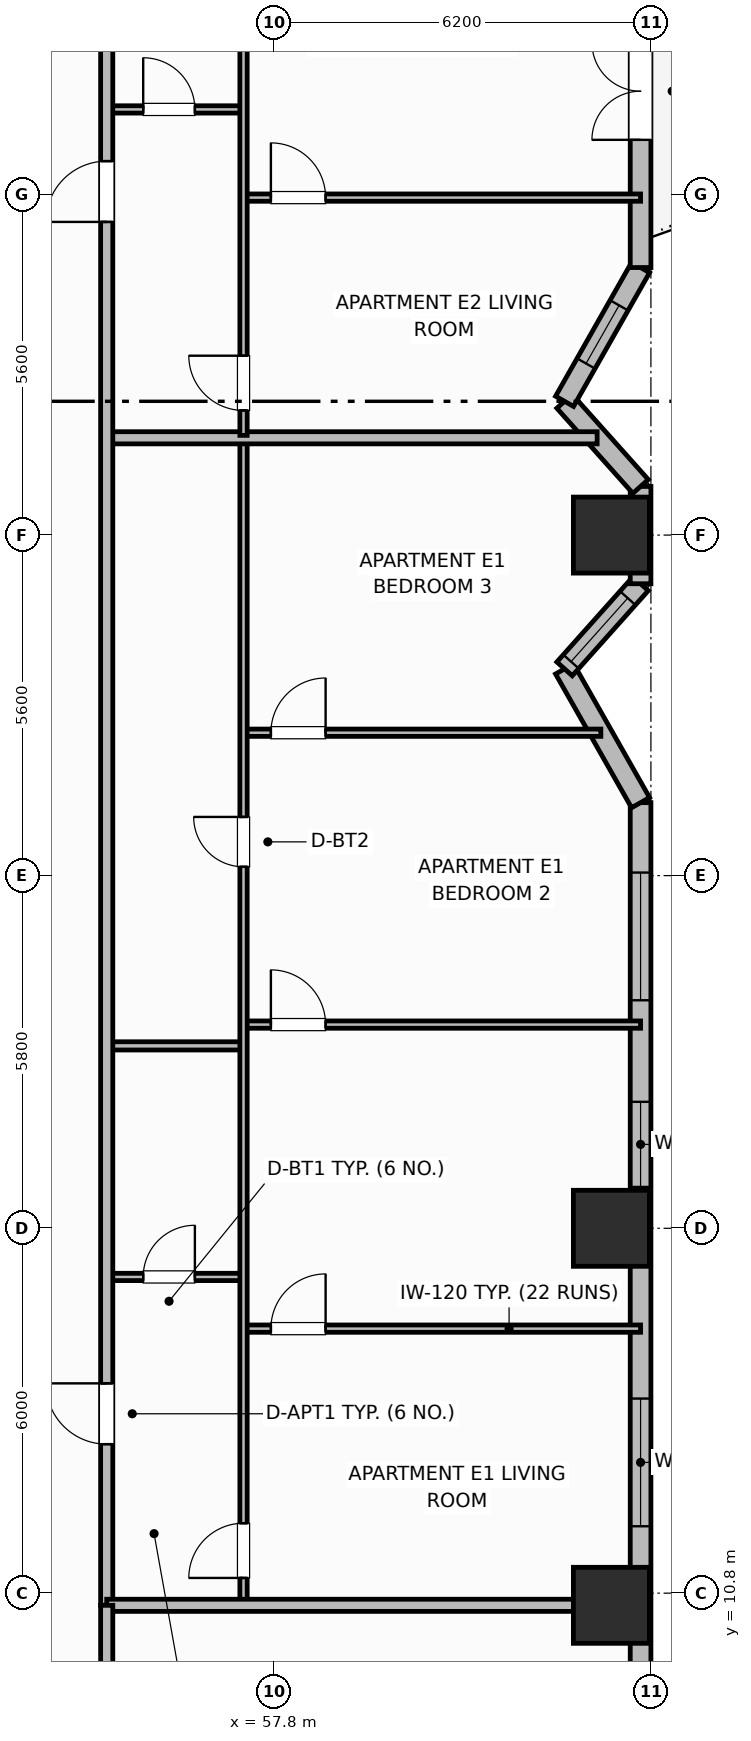
"""IFC4 building model, lengths in metres.
Left out: names, types, materials, properties, quantities, classifications, styles, units other than length and angle.
Written with IfcOpenShell. Run it as: python <this file> out.ifc"""

import sys

from ifc_helpers import new_model, si_unit, direction, frame, frame_2d, origin, origin_2d, place, context, subcontext, project, spatial, rectangle, extrude, element, fill, save


model = new_model("IFC4")
c1 = context("Model", 3, precision=1e-05, world=origin(), true_north=direction((0.0, 1.0)))
c2 = subcontext(c1, "Body", "Model", "MODEL_VIEW")
j1 = project(units=[si_unit("LENGTHUNIT", "METRE"), si_unit("PLANEANGLEUNIT", "RADIAN")], contexts=[c1])
p1 = place(None, origin())
s1 = spatial("IfcSite", under=j1, at=p1, CompositionType="ELEMENT")
p2 = place(p1, origin())
s2 = spatial("IfcBuilding", under=s1, at=p2, CompositionType="ELEMENT")
p3 = place(p2, frame((0.0, 0.0, 54.7)))
s3 = spatial("IfcBuildingStorey", under=s2, at=p3, CompositionType="ELEMENT", Elevation=54.7)
for number, where, z_axis, x_axis in (
    (1, (63.35, 10.6, 0.0), (0.0, 0.0, 1.0), (1.0, 0.0, 0.0)),
    (2, (63.35, 16.8, 0.0), (0.0, 0.0, 1.0), (1.0, 0.0, 0.0)),
    (3, (63.35, 28.2, 0.0), (0.0, 0.0, 1.0), (1.0, 0.0, 0.0)),
):
    element("IfcColumn", number, at=place(p3, frame(where, z_axis=z_axis, x_axis=x_axis)), inside=s3, PredefinedType="COLUMN", context=c2, shape_type="SweptSolid", body=[
        extrude(rectangle(XDim=1.25, YDim=1.25, at=origin_2d()), origin(), (0.0, 0.0, 1.0), 3.7),
    ])
p4 = place(p3, frame((63.83, 9.0, 0.0), z_axis=(0.0, 0.0, 1.0), x_axis=(0.0, 1.0, 0.0)))
e4 = element("IfcWall", 4, at=p4, inside=s3, PredefinedType="SOLIDWALL", context=c2, shape_type="SweptSolid", body=[
    extrude(rectangle(XDim=14.8, YDim=0.34, at=frame_2d((7.4, 0.0))), origin(), (0.0, 0.0, 1.0), 2.7),
])
p5 = place(p4, frame((2.9, 0.0, 0.68)))
e5 = element("IfcOpeningElement", 5, at=p5, cuts=e4, PredefinedType="OPENING", context=c2, shape_type="SweptSolid", body=[
    extrude(rectangle(XDim=2.1, YDim=1.9, at=frame_2d((1.05, 0.95))), frame((0.0, 0.18, 0.0), z_axis=(0.0, -1.0, 0.0), x_axis=(1.0, 0.0, 0.0)), (0.0, 0.0, 1.0), 0.36),
])
p6 = place(p4, frame((8.48, 0.0, 0.69)))
e6 = element("IfcOpeningElement", 6, at=p6, cuts=e4, PredefinedType="OPENING", context=c2, shape_type="SweptSolid", body=[
    extrude(rectangle(XDim=1.4, YDim=1.85, at=frame_2d((0.7, 0.925))), frame((0.0, 0.18, 0.0), z_axis=(0.0, -1.0, 0.0), x_axis=(1.0, 0.0, 0.0)), (0.0, 0.0, 1.0), 0.36),
])
p7 = place(p4, frame((11.55, 0.0, 0.68)))
e7 = element("IfcOpeningElement", 7, at=p7, cuts=e4, PredefinedType="OPENING", context=c2, shape_type="SweptSolid", body=[
    extrude(rectangle(XDim=2.1, YDim=1.9, at=frame_2d((1.05, 0.95))), frame((0.0, 0.18, 0.0), z_axis=(0.0, -1.0, 0.0), x_axis=(1.0, 0.0, 0.0)), (0.0, 0.0, 1.0), 0.36),
])
p8 = place(p3, frame((63.83, 23.8, 0.0), z_axis=(0.0, 0.0, 1.0), x_axis=(-0.494017696272, 0.869451847873, 0.0)))
e8 = element("IfcWall", 8, at=p8, inside=s3, PredefinedType="SOLIDWALL", context=c2, shape_type="SweptSolid", body=[
    extrude(rectangle(XDim=2.53, YDim=0.34, at=frame_2d((1.265, 0.0))), origin(), (0.0, 0.0, 1.0), 2.7),
])
p9 = place(p3, frame((62.58, 26.0, 0.0), z_axis=(0.0, 0.0, 1.0), x_axis=(0.666041619974, 0.74591457987, 0.0)))
e9 = element("IfcWall", 9, at=p9, inside=s3, PredefinedType="SOLIDWALL", context=c2, shape_type="SweptSolid", body=[
    extrude(rectangle(XDim=1.877, YDim=0.34, at=frame_2d((0.938, 0.0))), origin(), (0.0, 0.0, 1.0), 2.7),
])
p10 = place(p9, frame((0.16, 0.0, 0.69)))
e10 = element("IfcOpeningElement", 10, at=p10, cuts=e9, PredefinedType="OPENING", context=c2, shape_type="SweptSolid", body=[
    extrude(rectangle(XDim=1.4, YDim=1.85, at=frame_2d((0.7, 0.925))), frame((0.0, 0.18, 0.0), z_axis=(0.0, -1.0, 0.0), x_axis=(1.0, 0.0, 0.0)), (0.0, 0.0, 1.0), 0.36),
])
p11 = place(p3, frame((63.83, 27.4, 0.0), z_axis=(0.0, 0.0, 1.0), x_axis=(0.0, 1.0, 0.0)))
e11 = element("IfcWall", 11, at=p11, inside=s3, PredefinedType="SOLIDWALL", context=c2, shape_type="SweptSolid", body=[
    extrude(rectangle(XDim=1.6, YDim=0.34, at=frame_2d((0.8, 0.0))), origin(), (0.0, 0.0, 1.0), 2.7),
])
p12 = place(p3, frame((63.83, 29.0, 0.0), z_axis=(0.0, 0.0, 1.0), x_axis=(-0.666041619974, 0.74591457987, 0.0)))
e12 = element("IfcWall", 12, at=p12, inside=s3, PredefinedType="SOLIDWALL", context=c2, shape_type="SweptSolid", body=[
    extrude(rectangle(XDim=1.877, YDim=0.34, at=frame_2d((0.938, 0.0))), origin(), (0.0, 0.0, 1.0), 2.7),
])
p13 = place(p3, frame((62.58, 30.4, 0.0), z_axis=(0.0, 0.0, 1.0), x_axis=(0.493976255291, 0.869475393101, 0.0)))
e13 = element("IfcWall", 13, at=p13, inside=s3, PredefinedType="SOLIDWALL", context=c2, shape_type="SweptSolid", body=[
    extrude(rectangle(XDim=2.531, YDim=0.34, at=frame_2d((1.265, 0.0))), origin(), (0.0, 0.0, 1.0), 2.7),
])
p14 = place(p13, frame((0.715, 0.0, 0.89)))
e14 = element("IfcOpeningElement", 14, at=p14, cuts=e13, PredefinedType="OPENING", context=c2, shape_type="SweptSolid", body=[
    extrude(rectangle(XDim=1.1, YDim=1.65, at=frame_2d((0.55, 0.825))), frame((0.0, 0.18, 0.0), z_axis=(0.0, -1.0, 0.0), x_axis=(1.0, 0.0, 0.0)), (0.0, 0.0, 1.0), 0.36),
])
p15 = place(p3, frame((63.83, 32.6, 0.0), z_axis=(0.0, 0.0, 1.0), x_axis=(0.0, 1.0, 0.0)))
e15 = element("IfcWall", 15, at=p15, inside=s3, PredefinedType="SOLIDWALL", context=c2, shape_type="SweptSolid", body=[
    extrude(rectangle(XDim=14.8, YDim=0.34, at=frame_2d((7.4, 0.0))), origin(), (0.0, 0.0, 1.0), 2.7),
])
p16 = place(p15, frame((2.1, 0.0, 0.0)))
e16 = element("IfcOpeningElement", 16, at=p16, cuts=e15, PredefinedType="OPENING", context=c2, shape_type="SweptSolid", body=[
    extrude(rectangle(XDim=1.6, YDim=2.1, at=frame_2d((0.8, 1.05))), frame((0.0, 0.18, 0.0), z_axis=(0.0, -1.0, 0.0), x_axis=(1.0, 0.0, 0.0)), (0.0, 0.0, 1.0), 0.36),
])
p17 = place(p15, frame((7.68, 0.0, 0.89)))
e17 = element("IfcOpeningElement", 17, at=p17, cuts=e15, PredefinedType="OPENING", context=c2, shape_type="SweptSolid", body=[
    extrude(rectangle(XDim=1.1, YDim=1.65, at=frame_2d((0.55, 0.825))), frame((0.0, 0.18, 0.0), z_axis=(0.0, -1.0, 0.0), x_axis=(1.0, 0.0, 0.0)), (0.0, 0.0, 1.0), 0.36),
])
p18 = place(p15, frame((9.95, 0.0, 0.73)))
e18 = element("IfcOpeningElement", 18, at=p18, cuts=e15, PredefinedType="OPENING", context=c2, shape_type="SweptSolid", body=[
    extrude(rectangle(XDim=1.8, YDim=1.85, at=frame_2d((0.9, 0.925))), frame((0.0, 0.18, 0.0), z_axis=(0.0, -1.0, 0.0), x_axis=(1.0, 0.0, 0.0)), (0.0, 0.0, 1.0), 0.36),
])
p19 = place(p3, frame((55.05, 16.0, 0.0), z_axis=(0.0, 0.0, 1.0), x_axis=(1.0, 0.0, 0.0)))
e19 = element("IfcWall", 19, at=p19, inside=s3, PredefinedType="PARTITIONING", context=c2, shape_type="SweptSolid", body=[
    extrude(rectangle(XDim=2.25, YDim=0.12, at=frame_2d((1.125, 0.0))), origin(), (0.0, 0.0, 1.0), 2.53),
])
p20 = place(p19, frame((0.6, 0.0, 0.0)))
e20 = element("IfcOpeningElement", 20, at=p20, cuts=e19, PredefinedType="OPENING", context=c2, shape_type="SweptSolid", body=[
    extrude(rectangle(XDim=0.85, YDim=2.1, at=frame_2d((0.425, 1.05))), frame((0.0, 0.07, 0.0), z_axis=(0.0, -1.0, 0.0), x_axis=(1.0, 0.0, 0.0)), (0.0, 0.0, 1.0), 0.14),
])
p21 = place(p3, frame((55.05, 19.8, 0.0), z_axis=(0.0, 0.0, 1.0), x_axis=(1.0, 0.0, 0.0)))
e21 = element("IfcWall", 21, at=p21, inside=s3, PredefinedType="PARTITIONING", context=c2, shape_type="SweptSolid", body=[
    extrude(rectangle(XDim=2.25, YDim=0.135, at=frame_2d((1.125, 0.0))), origin(), (0.0, 0.0, 1.0), 2.53),
])
p22 = place(p3, frame((57.3, 15.15, 0.0), z_axis=(0.0, 0.0, 1.0), x_axis=(1.0, 0.0, 0.0)))
e22 = element("IfcWall", 22, at=p22, inside=s3, PredefinedType="PARTITIONING", context=c2, shape_type="SweptSolid", body=[
    extrude(rectangle(XDim=6.53, YDim=0.12, at=frame_2d((3.265, 0.0))), origin(), (0.0, 0.0, 1.0), 2.53),
])
p23 = place(p22, frame((0.45, 0.0, 0.0)))
e23 = element("IfcOpeningElement", 23, at=p23, cuts=e22, PredefinedType="OPENING", context=c2, shape_type="SweptSolid", body=[
    extrude(rectangle(XDim=0.9, YDim=2.1, at=frame_2d((0.45, 1.05))), frame((0.0, 0.07, 0.0), z_axis=(0.0, -1.0, 0.0), x_axis=(1.0, 0.0, 0.0)), (0.0, 0.0, 1.0), 0.14),
])
p24 = place(p3, frame((57.3, 20.15, 0.0), z_axis=(0.0, 0.0, 1.0), x_axis=(1.0, 0.0, 0.0)))
e24 = element("IfcWall", 24, at=p24, inside=s3, PredefinedType="PARTITIONING", context=c2, shape_type="SweptSolid", body=[
    extrude(rectangle(XDim=6.53, YDim=0.12, at=frame_2d((3.265, 0.0))), origin(), (0.0, 0.0, 1.0), 2.53),
])
p25 = place(p24, frame((0.45, 0.0, 0.0)))
e25 = element("IfcOpeningElement", 25, at=p25, cuts=e24, PredefinedType="OPENING", context=c2, shape_type="SweptSolid", body=[
    extrude(rectangle(XDim=0.9, YDim=2.1, at=frame_2d((0.45, 1.05))), frame((0.0, 0.07, 0.0), z_axis=(0.0, -1.0, 0.0), x_axis=(1.0, 0.0, 0.0)), (0.0, 0.0, 1.0), 0.14),
])
p26 = place(p3, frame((57.3, 24.95, 0.0), z_axis=(0.0, 0.0, 1.0), x_axis=(1.0, 0.0, 0.0)))
e26 = element("IfcWall", 26, at=p26, inside=s3, PredefinedType="PARTITIONING", context=c2, shape_type="SweptSolid", body=[
    extrude(rectangle(XDim=5.876, YDim=0.12, at=frame_2d((2.938, 0.0))), origin(), (0.0, 0.0, 1.0), 2.53),
])
p27 = place(p26, frame((0.45, 0.0, 0.0)))
e27 = element("IfcOpeningElement", 27, at=p27, cuts=e26, PredefinedType="OPENING", context=c2, shape_type="SweptSolid", body=[
    extrude(rectangle(XDim=0.9, YDim=2.1, at=frame_2d((0.45, 1.05))), frame((0.0, 0.07, 0.0), z_axis=(0.0, -1.0, 0.0), x_axis=(1.0, 0.0, 0.0)), (0.0, 0.0, 1.0), 0.14),
])
p28 = place(p3, frame((57.3, 10.64, 0.0), z_axis=(0.0, 0.0, 1.0), x_axis=(0.0, 1.0, 0.0)))
e28 = element("IfcWall", 28, at=p28, inside=s3, PredefinedType="PARTITIONING", context=c2, shape_type="SweptSolid", body=[
    extrude(rectangle(XDim=19.12, YDim=0.12, at=frame_2d((9.56, 0.0))), origin(), (0.0, 0.0, 1.0), 2.53),
])
p29 = place(p28, frame((0.41, 0.0, 0.0)))
e29 = element("IfcOpeningElement", 29, at=p29, cuts=e28, PredefinedType="OPENING", context=c2, shape_type="SweptSolid", body=[
    extrude(rectangle(XDim=0.9, YDim=2.1, at=frame_2d((0.45, 1.05))), frame((0.0, 0.07, 0.0), z_axis=(0.0, -1.0, 0.0), x_axis=(1.0, 0.0, 0.0)), (0.0, 0.0, 1.0), 0.14),
])
p30 = place(p28, frame((12.105, 0.0, 0.0)))
e30 = element("IfcOpeningElement", 30, at=p30, cuts=e28, PredefinedType="OPENING", context=c2, shape_type="SweptSolid", body=[
    extrude(rectangle(XDim=0.82, YDim=2.08, at=frame_2d((0.41, 1.04))), frame((0.0, 0.07, 0.0), z_axis=(0.0, -1.0, 0.0), x_axis=(1.0, 0.0, 0.0)), (0.0, 0.0, 1.0), 0.14),
])
p31 = place(p3, frame((55.05, 29.8, 0.0), z_axis=(0.0, 0.0, 1.0), x_axis=(1.0, 0.0, 0.0)))
e31 = element("IfcWall", 31, at=p31, inside=s3, PredefinedType="PARTITIONING", context=c2, shape_type="SweptSolid", body=[
    extrude(rectangle(XDim=8.066, YDim=0.2, at=frame_2d((4.033, 0.0))), origin(), (0.0, 0.0, 1.0), 2.53),
])
p32 = place(p3, frame((55.05, 35.2, 0.0), z_axis=(0.0, 0.0, 1.0), x_axis=(1.0, 0.0, 0.0)))
e32 = element("IfcWall", 32, at=p32, inside=s3, PredefinedType="PARTITIONING", context=c2, shape_type="SweptSolid", body=[
    extrude(rectangle(XDim=2.25, YDim=0.12, at=frame_2d((1.125, 0.0))), origin(), (0.0, 0.0, 1.0), 2.53),
])
p33 = place(p32, frame((0.6, 0.0, 0.0)))
e33 = element("IfcOpeningElement", 33, at=p33, cuts=e32, PredefinedType="OPENING", context=c2, shape_type="SweptSolid", body=[
    extrude(rectangle(XDim=0.85, YDim=2.1, at=frame_2d((0.425, 1.05))), frame((0.0, 0.07, 0.0), z_axis=(0.0, -1.0, 0.0), x_axis=(1.0, 0.0, 0.0)), (0.0, 0.0, 1.0), 0.14),
])
p34 = place(p3, frame((57.3, 33.75, 0.0), z_axis=(0.0, 0.0, 1.0), x_axis=(1.0, 0.0, 0.0)))
e34 = element("IfcWall", 34, at=p34, inside=s3, PredefinedType="PARTITIONING", context=c2, shape_type="SweptSolid", body=[
    extrude(rectangle(XDim=6.53, YDim=0.12, at=frame_2d((3.265, 0.0))), origin(), (0.0, 0.0, 1.0), 2.53),
])
p35 = place(p34, frame((0.45, 0.0, 0.0)))
e35 = element("IfcOpeningElement", 35, at=p35, cuts=e34, PredefinedType="OPENING", context=c2, shape_type="SweptSolid", body=[
    extrude(rectangle(XDim=0.9, YDim=2.1, at=frame_2d((0.45, 1.05))), frame((0.0, 0.07, 0.0), z_axis=(0.0, -1.0, 0.0), x_axis=(1.0, 0.0, 0.0)), (0.0, 0.0, 1.0), 0.14),
])
p36 = place(p3, frame((57.3, 29.84, 0.0), z_axis=(0.0, 0.0, 1.0), x_axis=(0.0, 1.0, 0.0)))
e36 = element("IfcWall", 36, at=p36, inside=s3, PredefinedType="PARTITIONING", context=c2, shape_type="SweptSolid", body=[
    extrude(rectangle(XDim=15.92, YDim=0.12, at=frame_2d((7.96, 0.0))), origin(), (0.0, 0.0, 1.0), 2.53),
])
p37 = place(p36, frame((0.41, 0.0, 0.0)))
e37 = element("IfcOpeningElement", 37, at=p37, cuts=e36, PredefinedType="OPENING", context=c2, shape_type="SweptSolid", body=[
    extrude(rectangle(XDim=0.9, YDim=2.1, at=frame_2d((0.45, 1.05))), frame((0.0, 0.07, 0.0), z_axis=(0.0, -1.0, 0.0), x_axis=(1.0, 0.0, 0.0)), (0.0, 0.0, 1.0), 0.14),
])
p38 = place(p36, frame((13.125, 0.0, 0.0)))
e38 = element("IfcOpeningElement", 38, at=p38, cuts=e36, PredefinedType="OPENING", context=c2, shape_type="SweptSolid", body=[
    extrude(rectangle(XDim=0.82, YDim=2.08, at=frame_2d((0.41, 1.04))), frame((0.0, 0.07, 0.0), z_axis=(0.0, -1.0, 0.0), x_axis=(1.0, 0.0, 0.0)), (0.0, 0.0, 1.0), 0.14),
])
p39 = place(p3, frame((55.05, 10.6, 0.0), z_axis=(0.0, 0.0, 1.0), x_axis=(0.0, 1.0, 0.0)))
e39 = element("IfcWall", 39, at=p39, inside=s3, PredefinedType="PARTITIONING", context=c2, shape_type="SweptSolid", body=[
    extrude(rectangle(XDim=35.2, YDim=0.2, at=frame_2d((17.6, 0.0))), origin(), (0.0, 0.0, 1.0), 2.53),
])
p40 = place(p39, frame((2.65, 0.0, 0.0)))
e40 = element("IfcOpeningElement", 40, at=p40, cuts=e39, PredefinedType="OPENING", context=c2, shape_type="SweptSolid", body=[
    extrude(rectangle(XDim=1.0, YDim=2.15, at=frame_2d((0.5, 1.075))), frame((0.0, 0.11, 0.0), z_axis=(0.0, -1.0, 0.0), x_axis=(1.0, 0.0, 0.0)), (0.0, 0.0, 1.0), 0.22),
])
p41 = place(p39, frame((22.75, 0.0, 0.0)))
e41 = element("IfcOpeningElement", 41, at=p41, cuts=e39, PredefinedType="OPENING", context=c2, shape_type="SweptSolid", body=[
    extrude(rectangle(XDim=1.0, YDim=2.15, at=frame_2d((0.5, 1.075))), frame((0.0, 0.11, 0.0), z_axis=(0.0, -1.0, 0.0), x_axis=(1.0, 0.0, 0.0)), (0.0, 0.0, 1.0), 0.22),
])
p42 = place(p3, frame((55.05, 10.6, 0.0), z_axis=(0.0, 0.0, 1.0), x_axis=(1.0, 0.0, 0.0)))
e42 = element("IfcWall", 42, at=p42, inside=s3, PredefinedType="PARTITIONING", context=c2, shape_type="SweptSolid", body=[
    extrude(rectangle(XDim=8.36, YDim=0.2, at=frame_2d((4.18, 0.0))), origin(), (0.0, 0.0, 1.0), 2.53),
])
p43 = place(p3, frame((55.05, 4.97, 0.0), z_axis=(0.0, 0.0, 1.0), x_axis=(0.0, 1.0, 0.0)))
e43 = element("IfcWall", 43, at=p43, inside=s3, PredefinedType="PARTITIONING", context=c2, shape_type="SweptSolid", body=[
    extrude(rectangle(XDim=5.63, YDim=0.2, at=frame_2d((2.815, 0.0))), origin(), (0.0, 0.0, 1.0), 2.53),
])
p44 = place(p5, origin())
e44 = element("IfcWindow", 44, at=p44, inside=s3, PartitioningType="SINGLE_PANEL", PredefinedType="WINDOW", context=c2, shape_type="SweptSolid", body=[
    extrude(rectangle(XDim=2.1, YDim=1.9, at=frame_2d((1.05, 0.95))), frame((0.0, 0.03, 0.0), z_axis=(0.0, -1.0, 0.0), x_axis=(1.0, 0.0, 0.0)), (0.0, 0.0, 1.0), 0.06),
])
fill(e5, e44)
p45 = place(p6, origin())
e45 = element("IfcWindow", 45, at=p45, inside=s3, PartitioningType="SINGLE_PANEL", PredefinedType="WINDOW", context=c2, shape_type="SweptSolid", body=[
    extrude(rectangle(XDim=1.4, YDim=1.85, at=frame_2d((0.7, 0.925))), frame((0.0, 0.03, 0.0), z_axis=(0.0, -1.0, 0.0), x_axis=(1.0, 0.0, 0.0)), (0.0, 0.0, 1.0), 0.06),
])
fill(e6, e45)
p46 = place(p7, origin())
e46 = element("IfcWindow", 46, at=p46, inside=s3, PartitioningType="SINGLE_PANEL", PredefinedType="WINDOW", context=c2, shape_type="SweptSolid", body=[
    extrude(rectangle(XDim=2.1, YDim=1.9, at=frame_2d((1.05, 0.95))), frame((0.0, 0.03, 0.0), z_axis=(0.0, -1.0, 0.0), x_axis=(1.0, 0.0, 0.0)), (0.0, 0.0, 1.0), 0.06),
])
fill(e7, e46)
p47 = place(p10, origin())
e47 = element("IfcWindow", 47, at=p47, inside=s3, PartitioningType="SINGLE_PANEL", PredefinedType="WINDOW", context=c2, shape_type="SweptSolid", body=[
    extrude(rectangle(XDim=1.4, YDim=1.85, at=frame_2d((0.7, 0.925))), frame((0.0, 0.03, 0.0), z_axis=(0.0, -1.0, 0.0), x_axis=(1.0, 0.0, 0.0)), (0.0, 0.0, 1.0), 0.06),
])
fill(e10, e47)
p48 = place(p14, origin())
e48 = element("IfcWindow", 48, at=p48, inside=s3, PartitioningType="SINGLE_PANEL", PredefinedType="WINDOW", context=c2, shape_type="SweptSolid", body=[
    extrude(rectangle(XDim=1.1, YDim=1.65, at=frame_2d((0.55, 0.825))), frame((0.0, 0.03, 0.0), z_axis=(0.0, -1.0, 0.0), x_axis=(1.0, 0.0, 0.0)), (0.0, 0.0, 1.0), 0.06),
])
fill(e14, e48)
p49 = place(p16, origin())
e49 = element("IfcDoor", 49, at=p49, inside=s3, OperationType="DOUBLE_DOOR_SINGLE_SWING", PredefinedType="DOOR", context=c2, shape_type="SweptSolid", body=[
    extrude(rectangle(XDim=1.6, YDim=2.1, at=frame_2d((0.8, 1.05))), frame((0.0, 0.025, 0.0), z_axis=(0.0, -1.0, 0.0), x_axis=(1.0, 0.0, 0.0)), (0.0, 0.0, 1.0), 0.05),
])
fill(e16, e49)
p50 = place(p20, origin())
e50 = element("IfcDoor", 50, at=p50, inside=s3, OperationType="SINGLE_SWING_RIGHT", PredefinedType="DOOR", context=c2, shape_type="SweptSolid", body=[
    extrude(rectangle(XDim=0.85, YDim=2.1, at=frame_2d((0.425, 1.05))), frame((0.0, 0.025, 0.0), z_axis=(0.0, -1.0, 0.0), x_axis=(1.0, 0.0, 0.0)), (0.0, 0.0, 1.0), 0.05),
])
fill(e20, e50)
p51 = place(p23, origin())
e51 = element("IfcDoor", 51, at=p51, inside=s3, OperationType="SINGLE_SWING_RIGHT", PredefinedType="DOOR", context=c2, shape_type="SweptSolid", body=[
    extrude(rectangle(XDim=0.9, YDim=2.1, at=frame_2d((0.45, 1.05))), frame((0.0, 0.025, 0.0), z_axis=(0.0, -1.0, 0.0), x_axis=(1.0, 0.0, 0.0)), (0.0, 0.0, 1.0), 0.05),
])
fill(e23, e51)
p52 = place(p25, origin())
e52 = element("IfcDoor", 52, at=p52, inside=s3, OperationType="SINGLE_SWING_LEFT", PredefinedType="DOOR", context=c2, shape_type="SweptSolid", body=[
    extrude(rectangle(XDim=0.9, YDim=2.1, at=frame_2d((0.45, 1.05))), frame((0.0, 0.025, 0.0), z_axis=(0.0, -1.0, 0.0), x_axis=(1.0, 0.0, 0.0)), (0.0, 0.0, 1.0), 0.05),
])
fill(e25, e52)
p53 = place(p27, origin())
e53 = element("IfcDoor", 53, at=p53, inside=s3, OperationType="SINGLE_SWING_RIGHT", PredefinedType="DOOR", context=c2, shape_type="SweptSolid", body=[
    extrude(rectangle(XDim=0.9, YDim=2.1, at=frame_2d((0.45, 1.05))), frame((0.0, 0.025, 0.0), z_axis=(0.0, -1.0, 0.0), x_axis=(1.0, 0.0, 0.0)), (0.0, 0.0, 1.0), 0.05),
])
fill(e27, e53)
p54 = place(p29, origin())
e54 = element("IfcDoor", 54, at=p54, inside=s3, OperationType="SINGLE_SWING_LEFT", PredefinedType="DOOR", context=c2, shape_type="SweptSolid", body=[
    extrude(rectangle(XDim=0.9, YDim=2.1, at=frame_2d((0.45, 1.05))), frame((0.0, 0.025, 0.0), z_axis=(0.0, -1.0, 0.0), x_axis=(1.0, 0.0, 0.0)), (0.0, 0.0, 1.0), 0.05),
])
fill(e29, e54)
p55 = place(p30, origin())
e55 = element("IfcDoor", 55, at=p55, inside=s3, OperationType="SINGLE_SWING_RIGHT", PredefinedType="DOOR", context=c2, shape_type="SweptSolid", body=[
    extrude(rectangle(XDim=0.82, YDim=2.08, at=frame_2d((0.41, 1.04))), frame((0.0, 0.025, 0.0), z_axis=(0.0, -1.0, 0.0), x_axis=(1.0, 0.0, 0.0)), (0.0, 0.0, 1.0), 0.05),
])
fill(e30, e55)
p56 = place(p33, origin())
e56 = element("IfcDoor", 56, at=p56, inside=s3, OperationType="SINGLE_SWING_LEFT", PredefinedType="DOOR", context=c2, shape_type="SweptSolid", body=[
    extrude(rectangle(XDim=0.85, YDim=2.1, at=frame_2d((0.425, 1.05))), frame((0.0, 0.025, 0.0), z_axis=(0.0, -1.0, 0.0), x_axis=(1.0, 0.0, 0.0)), (0.0, 0.0, 1.0), 0.05),
])
fill(e33, e56)
p57 = place(p35, origin())
e57 = element("IfcDoor", 57, at=p57, inside=s3, OperationType="SINGLE_SWING_LEFT", PredefinedType="DOOR", context=c2, shape_type="SweptSolid", body=[
    extrude(rectangle(XDim=0.9, YDim=2.1, at=frame_2d((0.45, 1.05))), frame((0.0, 0.025, 0.0), z_axis=(0.0, -1.0, 0.0), x_axis=(1.0, 0.0, 0.0)), (0.0, 0.0, 1.0), 0.05),
])
fill(e35, e57)
p58 = place(p37, origin())
e58 = element("IfcDoor", 58, at=p58, inside=s3, OperationType="SINGLE_SWING_RIGHT", PredefinedType="DOOR", context=c2, shape_type="SweptSolid", body=[
    extrude(rectangle(XDim=0.9, YDim=2.1, at=frame_2d((0.45, 1.05))), frame((0.0, 0.025, 0.0), z_axis=(0.0, -1.0, 0.0), x_axis=(1.0, 0.0, 0.0)), (0.0, 0.0, 1.0), 0.05),
])
fill(e37, e58)
p59 = place(p40, origin())
e59 = element("IfcDoor", 59, at=p59, inside=s3, OperationType="SINGLE_SWING_RIGHT", PredefinedType="DOOR", context=c2, shape_type="SweptSolid", body=[
    extrude(rectangle(XDim=1.0, YDim=2.15, at=frame_2d((0.5, 1.075))), frame((0.0, 0.025, 0.0), z_axis=(0.0, -1.0, 0.0), x_axis=(1.0, 0.0, 0.0)), (0.0, 0.0, 1.0), 0.05),
])
fill(e40, e59)
p60 = place(p41, origin())
e60 = element("IfcDoor", 60, at=p60, inside=s3, OperationType="SINGLE_SWING_LEFT", PredefinedType="DOOR", context=c2, shape_type="SweptSolid", body=[
    extrude(rectangle(XDim=1.0, YDim=2.15, at=frame_2d((0.5, 1.075))), frame((0.0, 0.025, 0.0), z_axis=(0.0, -1.0, 0.0), x_axis=(1.0, 0.0, 0.0)), (0.0, 0.0, 1.0), 0.05),
])
fill(e41, e60)
save(model, sys.argv[1])
